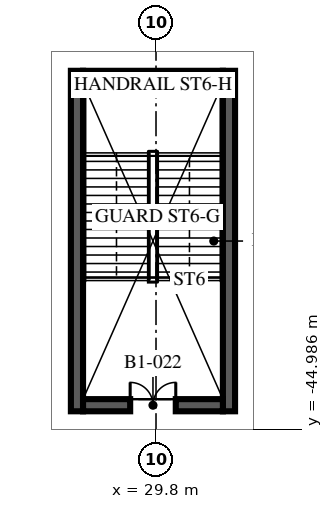
"""IFC4 building model, lengths in metres.
Left out: names, types, materials, properties, quantities, classifications, styles, units other than length and angle.
Written with IfcOpenShell. Run it as: python <this file> out.ifc"""

import sys

from ifc_helpers import new_model, si_unit, direction, frame, frame_2d, origin, place, context, subcontext, project, spatial, rectangle, extrude, element, fill, save


model = new_model("IFC4")
c1 = context("Model", 3, precision=1e-05, world=origin(), true_north=direction((0.0, 1.0)))
c2 = subcontext(c1, "Body", "Model", "MODEL_VIEW")
j1 = project(units=[si_unit("LENGTHUNIT", "METRE"), si_unit("PLANEANGLEUNIT", "RADIAN")], contexts=[c1])
p1 = place(None, origin())
s1 = spatial("IfcSite", under=j1, at=p1, CompositionType="ELEMENT")
p2 = place(p1, origin())
s2 = spatial("IfcBuilding", under=s1, at=p2, CompositionType="ELEMENT")
p3 = place(p2, frame((0.0, 0.0, -5.4)))
s3 = spatial("IfcBuildingStorey", under=s2, at=p3, CompositionType="ELEMENT", Elevation=-5.4)
for number, where, z_axis, x_axis in (
    (1, (27.2, -44.4, -0.3), (0.0, 0.0, 1.0), (0.0, 1.0, 0.0)),
    (2, (32.2, -44.4, -0.3), (0.0, 0.0, 1.0), (0.0, 1.0, 0.0)),
):
    element("IfcWall", number, at=place(p3, frame(where, z_axis=z_axis, x_axis=x_axis)), inside=s3, PredefinedType="SOLIDWALL", context=c2, shape_type="SweptSolid", body=[
        extrude(rectangle(XDim=11.2, YDim=0.4, at=frame_2d((5.6, 0.0))), origin(), (0.0, 0.0, 1.0), 5.1),
    ])
p4 = place(p3, frame((27.4, -44.2, -0.3), z_axis=(0.0, 0.0, 1.0), x_axis=(1.0, 0.0, 0.0)))
e3 = element("IfcWall", 3, at=p4, inside=s3, PredefinedType="SOLIDWALL", context=c2, shape_type="SweptSolid", body=[
    extrude(rectangle(XDim=4.6, YDim=0.4, at=frame_2d((2.3, 0.0))), origin(), (0.0, 0.0, 1.0), 5.1),
])
p5 = place(p4, frame((1.55, 0.0, 0.3)))
e4 = element("IfcOpeningElement", 4, at=p5, cuts=e3, PredefinedType="OPENING", context=c2, shape_type="SweptSolid", body=[
    extrude(rectangle(XDim=1.5, YDim=2.1, at=frame_2d((0.75, 1.05))), frame((0.0, 0.21, 0.0), z_axis=(0.0, -1.0, 0.0), x_axis=(1.0, 0.0, 0.0)), (0.0, 0.0, 1.0), 0.42),
])
p6 = place(p3, frame((27.4, -33.4, -0.3), z_axis=(0.0, 0.0, 1.0), x_axis=(1.0, 0.0, 0.0)))
e5 = element("IfcWall", 5, at=p6, inside=s3, PredefinedType="SOLIDWALL", context=c2, shape_type="SweptSolid", body=[
    extrude(rectangle(XDim=4.6, YDim=0.4, at=frame_2d((2.3, 0.0))), origin(), (0.0, 0.0, 1.0), 5.1),
])
p7 = place(p5, origin())
e6 = element("IfcDoor", 6, at=p7, inside=s3, OperationType="DOUBLE_DOOR_SINGLE_SWING", PredefinedType="DOOR", context=c2, shape_type="SweptSolid", body=[
    extrude(rectangle(XDim=1.5, YDim=2.1, at=frame_2d((0.75, 1.05))), frame((0.0, 0.025, 0.0), z_axis=(0.0, -1.0, 0.0), x_axis=(1.0, 0.0, 0.0)), (0.0, 0.0, 1.0), 0.05),
])
fill(e4, e6)
save(model, sys.argv[1])
